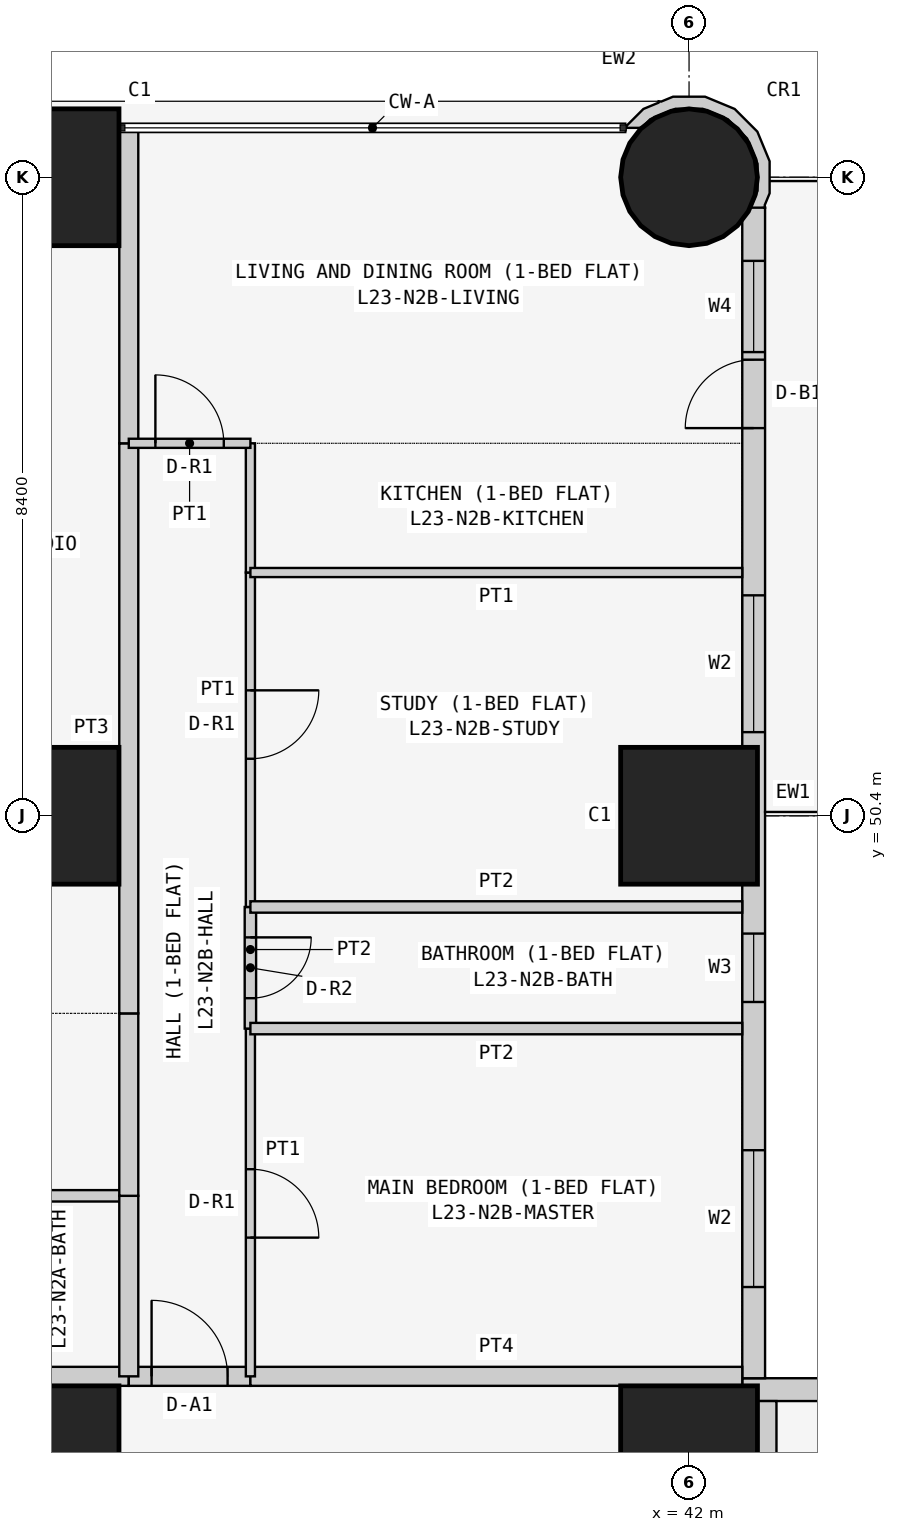
"""IFC4 building model, lengths in metres.
Left out: names, types, materials, properties, quantities, classifications, styles, units other than length and angle.
Written with IfcOpenShell. Run it as: python <this file> out.ifc"""

import sys

from ifc_helpers import new_model, si_unit, direction, frame, frame_2d, origin, origin_2d, place, context, subcontext, project, spatial, polyline, rectangle, circle, outline, extrude, element, fill, save


model = new_model("IFC4")
c1 = context("Model", 3, precision=1e-05, world=origin(), true_north=direction((0.0, 1.0)))
c2 = subcontext(c1, "Body", "Model", "MODEL_VIEW")
j1 = project(units=[si_unit("LENGTHUNIT", "METRE"), si_unit("PLANEANGLEUNIT", "RADIAN")], contexts=[c1])
p1 = place(None, origin())
s1 = spatial("IfcSite", under=j1, at=p1, CompositionType="ELEMENT")
p2 = place(p1, origin())
s2 = spatial("IfcBuilding", under=s1, at=p2, CompositionType="ELEMENT")
p3 = place(p2, frame((0.0, 0.0, 92.1)))
s3 = spatial("IfcBuildingStorey", under=s2, at=p3, CompositionType="ELEMENT", Elevation=92.1)
for number, where, z_axis, x_axis in (
    (1, (33.6, 42.0, 0.0), (0.0, 0.0, 1.0), (1.0, 0.0, 0.0)),
    (2, (33.6, 50.4, 0.0), (0.0, 0.0, 1.0), (1.0, 0.0, 0.0)),
    (3, (33.6, 58.8, 0.0), (0.0, 0.0, 1.0), (1.0, 0.0, 0.0)),
    (4, (42.0, 42.0, 0.0), (0.0, 0.0, 1.0), (1.0, 0.0, 0.0)),
    (5, (42.0, 50.4, 0.0), (0.0, 0.0, 1.0), (1.0, 0.0, 0.0)),
):
    element("IfcColumn", number, at=place(p3, frame(where, z_axis=z_axis, x_axis=x_axis)), inside=s3, PredefinedType="COLUMN", context=c2, shape_type="SweptSolid", body=[
        extrude(rectangle(XDim=1.8, YDim=1.8, at=origin_2d()), origin(), (0.0, 0.0, 1.0), 3.6),
    ])
p4 = place(p3, frame((42.0, 58.8, 0.0), z_axis=(0.0, 0.0, 1.0), x_axis=(1.0, 0.0, 0.0)))
e6 = element("IfcColumn", 6, at=p4, inside=s3, PredefinedType="COLUMN", context=c2, shape_type="SweptSolid", body=[
    extrude(circle(Radius=0.9, at=origin_2d()), origin(), (0.0, 0.0, 1.0), 3.6),
])
p5 = place(p3, frame((58.4, 42.85, 0.0), z_axis=(0.0, 0.0, 1.0), x_axis=(-1.0, 0.0, 0.0)))
e7 = element("IfcWall", 7, at=p5, inside=s3, PredefinedType="SOLIDWALL", context=c2, shape_type="SweptSolid", body=[
    extrude(rectangle(XDim=15.7, YDim=0.3, at=frame_2d((7.85, 0.0))), origin(), (0.0, 0.0, 1.0), 3.45),
])
p6 = place(p5, frame((12.4, 0.0, 0.9)))
e8 = element("IfcOpeningElement", 8, at=p6, cuts=e7, PredefinedType="OPENING", context=c2, shape_type="SweptSolid", body=[
    extrude(rectangle(XDim=1.8, YDim=1.5, at=frame_2d((0.9, 0.75))), frame((0.0, 0.16, 0.0), z_axis=(0.0, -1.0, 0.0), x_axis=(1.0, 0.0, 0.0)), (0.0, 0.0, 1.0), 0.32),
])
p7 = place(p5, frame((9.55, 0.0, 1.5)))
e9 = element("IfcOpeningElement", 9, at=p7, cuts=e7, PredefinedType="OPENING", context=c2, shape_type="SweptSolid", body=[
    extrude(rectangle(XDim=0.9, YDim=0.7, at=frame_2d((0.45, 0.35))), frame((0.0, 0.16, 0.0), z_axis=(0.0, -1.0, 0.0), x_axis=(1.0, 0.0, 0.0)), (0.0, 0.0, 1.0), 0.32),
])
p8 = place(p5, frame((5.1, 0.0, 0.9)))
e10 = element("IfcOpeningElement", 10, at=p8, cuts=e7, PredefinedType="OPENING", context=c2, shape_type="SweptSolid", body=[
    extrude(rectangle(XDim=1.8, YDim=1.5, at=frame_2d((0.9, 0.75))), frame((0.0, 0.16, 0.0), z_axis=(0.0, -1.0, 0.0), x_axis=(1.0, 0.0, 0.0)), (0.0, 0.0, 1.0), 0.32),
])
p9 = place(p5, frame((2.0, 0.0, 0.0)))
e11 = element("IfcOpeningElement", 11, at=p9, cuts=e7, PredefinedType="OPENING", context=c2, shape_type="SweptSolid", body=[
    extrude(rectangle(XDim=0.9, YDim=2.4, at=frame_2d((0.45, 1.2))), frame((0.0, 0.16, 0.0), z_axis=(0.0, -1.0, 0.0), x_axis=(1.0, 0.0, 0.0)), (0.0, 0.0, 1.0), 0.32),
])
p10 = place(p5, frame((0.7, 0.0, 0.9)))
e12 = element("IfcOpeningElement", 12, at=p10, cuts=e7, PredefinedType="OPENING", context=c2, shape_type="SweptSolid", body=[
    extrude(rectangle(XDim=1.2, YDim=1.5, at=frame_2d((0.6, 0.75))), frame((0.0, 0.16, 0.0), z_axis=(0.0, -1.0, 0.0), x_axis=(1.0, 0.0, 0.0)), (0.0, 0.0, 1.0), 0.32),
])
p11 = place(p3, frame((42.85, 43.0, 0.0), z_axis=(0.0, 0.0, 1.0), x_axis=(0.0, 1.0, 0.0)))
e13 = element("IfcWall", 13, at=p11, inside=s3, PredefinedType="SOLIDWALL", context=c2, shape_type="SweptSolid", body=[
    extrude(rectangle(XDim=15.4, YDim=0.3, at=frame_2d((7.7, 0.0))), origin(), (0.0, 0.0, 1.0), 3.45),
])
p12 = place(p11, frame((1.2, 0.0, 0.9)))
e14 = element("IfcOpeningElement", 14, at=p12, cuts=e13, PredefinedType="OPENING", context=c2, shape_type="SweptSolid", body=[
    extrude(rectangle(XDim=1.8, YDim=1.5, at=frame_2d((0.9, 0.75))), frame((0.0, 0.16, 0.0), z_axis=(0.0, -1.0, 0.0), x_axis=(1.0, 0.0, 0.0)), (0.0, 0.0, 1.0), 0.32),
])
p13 = place(p11, frame((4.95, 0.0, 1.5)))
e15 = element("IfcOpeningElement", 15, at=p13, cuts=e13, PredefinedType="OPENING", context=c2, shape_type="SweptSolid", body=[
    extrude(rectangle(XDim=0.9, YDim=0.7, at=frame_2d((0.45, 0.35))), frame((0.0, 0.16, 0.0), z_axis=(0.0, -1.0, 0.0), x_axis=(1.0, 0.0, 0.0)), (0.0, 0.0, 1.0), 0.32),
])
p14 = place(p11, frame((8.5, 0.0, 0.9)))
e16 = element("IfcOpeningElement", 16, at=p14, cuts=e13, PredefinedType="OPENING", context=c2, shape_type="SweptSolid", body=[
    extrude(rectangle(XDim=1.8, YDim=1.5, at=frame_2d((0.9, 0.75))), frame((0.0, 0.16, 0.0), z_axis=(0.0, -1.0, 0.0), x_axis=(1.0, 0.0, 0.0)), (0.0, 0.0, 1.0), 0.32),
])
p15 = place(p11, frame((12.5, 0.0, 0.0)))
e17 = element("IfcOpeningElement", 17, at=p15, cuts=e13, PredefinedType="OPENING", context=c2, shape_type="SweptSolid", body=[
    extrude(rectangle(XDim=0.9, YDim=2.4, at=frame_2d((0.45, 1.2))), frame((0.0, 0.16, 0.0), z_axis=(0.0, -1.0, 0.0), x_axis=(1.0, 0.0, 0.0)), (0.0, 0.0, 1.0), 0.32),
])
p16 = place(p11, frame((13.5, 0.0, 0.9)))
e18 = element("IfcOpeningElement", 18, at=p16, cuts=e13, PredefinedType="OPENING", context=c2, shape_type="SweptSolid", body=[
    extrude(rectangle(XDim=1.2, YDim=1.5, at=frame_2d((0.6, 0.75))), frame((0.0, 0.16, 0.0), z_axis=(0.0, -1.0, 0.0), x_axis=(1.0, 0.0, 0.0)), (0.0, 0.0, 1.0), 0.32),
])
p17 = place(p3, frame((42.91, 58.436, 0.0), z_axis=(0.0, 0.0, 1.0), x_axis=(0.377204953059, 0.926129809145, 0.0)))
e19 = element("IfcWall", 19, at=p17, inside=s3, PredefinedType="SOLIDWALL", context=c2, shape_type="SweptSolid", body=[
    extrude(outline(polyline([(0.769, 1.728), (0.75, 1.723), (0.6, 1.875), (0.295, 2.004), (0.281, 1.998), (0.36, 1.803), (0.509, 1.741), (0.761, 1.486), (0.896, 1.154), (0.894, 0.795), (0.755, 0.465), (0.5, 0.213), (0.168, 0.078), (-0.1, 0.08), (0.001, -0.097), (0.03, -0.08), (0.198, -0.081), (0.589, 0.078), (0.889, 0.374), (1.052, 0.763), (1.055, 1.185), (0.896, 1.575), (0.778, 1.695), (0.769, 1.728)])), origin(), (0.0, 0.0, 1.0), 3.45),
])
p18 = place(p3, frame((32.0, 43.025, 0.0), z_axis=(0.0, 0.0, 1.0), x_axis=(1.0, 0.0, 0.0)))
e20 = element("IfcWall", 20, at=p18, inside=s3, PredefinedType="PARTITIONING", context=c2, shape_type="SweptSolid", body=[
    extrude(rectangle(XDim=2.629, YDim=0.25, at=frame_2d((1.314, 0.0))), origin(), (0.0, 0.0, 1.0), 3.45),
])
p19 = place(p3, frame((34.629, 43.025, 0.0), z_axis=(0.0, 0.0, 1.0), x_axis=(1.0, 0.0, 0.0)))
e21 = element("IfcWall", 21, at=p19, inside=s3, PredefinedType="PARTITIONING", context=c2, shape_type="SweptSolid", body=[
    extrude(rectangle(XDim=1.6, YDim=0.25, at=frame_2d((0.8, 0.0))), origin(), (0.0, 0.0, 1.0), 3.45),
])
p20 = place(p19, frame((0.3, 0.0, 0.0)))
e22 = element("IfcOpeningElement", 22, at=p20, cuts=e21, PredefinedType="OPENING", context=c2, shape_type="SweptSolid", body=[
    extrude(rectangle(XDim=1.0, YDim=2.1, at=frame_2d((0.5, 1.05))), frame((0.0, 0.135, 0.0), z_axis=(0.0, -1.0, 0.0), x_axis=(1.0, 0.0, 0.0)), (0.0, 0.0, 1.0), 0.27),
])
p21 = place(p3, frame((36.229, 43.025, 0.0), z_axis=(0.0, 0.0, 1.0), x_axis=(1.0, 0.0, 0.0)))
e23 = element("IfcWall", 23, at=p21, inside=s3, PredefinedType="PARTITIONING", context=c2, shape_type="SweptSolid", body=[
    extrude(rectangle(XDim=6.471, YDim=0.25, at=frame_2d((3.235, 0.0))), origin(), (0.0, 0.0, 1.0), 3.45),
])
p22 = place(p3, frame((43.025, 42.7, 0.0), z_axis=(0.0, 0.0, 1.0), x_axis=(0.0, -1.0, 0.0)))
e24 = element("IfcWall", 24, at=p22, inside=s3, PredefinedType="PARTITIONING", context=c2, shape_type="SweptSolid", body=[
    extrude(rectangle(XDim=6.871, YDim=0.25, at=frame_2d((3.436, 0.0))), origin(), (0.0, 0.0, 1.0), 3.45),
])
p23 = place(p3, frame((32.0, 45.4, 0.0), z_axis=(0.0, 0.0, 1.0), x_axis=(1.0, 0.0, 0.0)))
e25 = element("IfcWall", 25, at=p23, inside=s3, PredefinedType="PARTITIONING", context=c2, shape_type="SweptSolid", body=[
    extrude(rectangle(XDim=2.629, YDim=0.15, at=frame_2d((1.314, 0.0))), origin(), (0.0, 0.0, 1.0), 3.45),
])
p24 = place(p3, frame((34.629, 45.4, 0.0), z_axis=(0.0, 0.0, 1.0), x_axis=(0.0, -1.0, 0.0)))
e26 = element("IfcWall", 26, at=p24, inside=s3, PredefinedType="PARTITIONING", context=c2, shape_type="SweptSolid", body=[
    extrude(rectangle(XDim=2.375, YDim=0.25, at=frame_2d((1.188, 0.0))), origin(), (0.0, 0.0, 1.0), 3.45),
])
p25 = place(p3, frame((34.629, 47.8, 0.0), z_axis=(0.0, 0.0, 1.0), x_axis=(0.0, -1.0, 0.0)))
e27 = element("IfcWall", 27, at=p25, inside=s3, PredefinedType="PARTITIONING", context=c2, shape_type="SweptSolid", body=[
    extrude(rectangle(XDim=2.4, YDim=0.25, at=frame_2d((1.2, 0.0))), origin(), (0.0, 0.0, 1.0), 3.45),
])
p26 = place(p3, frame((34.629, 55.3, 0.0), z_axis=(0.0, 0.0, 1.0), x_axis=(0.0, -1.0, 0.0)))
e28 = element("IfcWall", 28, at=p26, inside=s3, PredefinedType="PARTITIONING", context=c2, shape_type="SweptSolid", body=[
    extrude(rectangle(XDim=7.5, YDim=0.25, at=frame_2d((3.75, 0.0))), origin(), (0.0, 0.0, 1.0), 3.45),
])
p27 = place(p3, frame((34.629, 59.45, 0.0), z_axis=(0.0, 0.0, 1.0), x_axis=(0.0, -1.0, 0.0)))
e29 = element("IfcWall", 29, at=p27, inside=s3, PredefinedType="PARTITIONING", context=c2, shape_type="SweptSolid", body=[
    extrude(rectangle(XDim=4.15, YDim=0.25, at=frame_2d((2.075, 0.0))), origin(), (0.0, 0.0, 1.0), 3.45),
])
p28 = place(p3, frame((36.229, 47.6, 0.0), z_axis=(0.0, 0.0, 1.0), x_axis=(0.0, -1.0, 0.0)))
e30 = element("IfcWall", 30, at=p28, inside=s3, PredefinedType="PARTITIONING", context=c2, shape_type="SweptSolid", body=[
    extrude(rectangle(XDim=4.575, YDim=0.12, at=frame_2d((2.288, 0.0))), origin(), (0.0, 0.0, 1.0), 3.45),
])
p29 = place(p28, frame((1.85, 0.0, 0.0)))
e31 = element("IfcOpeningElement", 31, at=p29, cuts=e30, PredefinedType="OPENING", context=c2, shape_type="SweptSolid", body=[
    extrude(rectangle(XDim=0.9, YDim=2.1, at=frame_2d((0.45, 1.05))), frame((0.0, 0.07, 0.0), z_axis=(0.0, -1.0, 0.0), x_axis=(1.0, 0.0, 0.0)), (0.0, 0.0, 1.0), 0.14),
])
p30 = place(p3, frame((36.229, 49.2, 0.0), z_axis=(0.0, 0.0, 1.0), x_axis=(0.0, -1.0, 0.0)))
e32 = element("IfcWall", 32, at=p30, inside=s3, PredefinedType="PARTITIONING", context=c2, shape_type="SweptSolid", body=[
    extrude(rectangle(XDim=1.6, YDim=0.15, at=frame_2d((0.8, 0.0))), origin(), (0.0, 0.0, 1.0), 3.45),
])
p31 = place(p30, frame((0.4, 0.0, 0.0)))
e33 = element("IfcOpeningElement", 33, at=p31, cuts=e32, PredefinedType="OPENING", context=c2, shape_type="SweptSolid", body=[
    extrude(rectangle(XDim=0.8, YDim=2.1, at=frame_2d((0.4, 1.05))), frame((0.0, 0.085, 0.0), z_axis=(0.0, -1.0, 0.0), x_axis=(1.0, 0.0, 0.0)), (0.0, 0.0, 1.0), 0.17),
])
p32 = place(p3, frame((36.229, 53.6, 0.0), z_axis=(0.0, 0.0, 1.0), x_axis=(0.0, -1.0, 0.0)))
e34 = element("IfcWall", 34, at=p32, inside=s3, PredefinedType="PARTITIONING", context=c2, shape_type="SweptSolid", body=[
    extrude(rectangle(XDim=4.4, YDim=0.12, at=frame_2d((2.2, 0.0))), origin(), (0.0, 0.0, 1.0), 3.45),
])
p33 = place(p32, frame((1.55, 0.0, 0.0)))
e35 = element("IfcOpeningElement", 35, at=p33, cuts=e34, PredefinedType="OPENING", context=c2, shape_type="SweptSolid", body=[
    extrude(rectangle(XDim=0.9, YDim=2.1, at=frame_2d((0.45, 1.05))), frame((0.0, 0.07, 0.0), z_axis=(0.0, -1.0, 0.0), x_axis=(1.0, 0.0, 0.0)), (0.0, 0.0, 1.0), 0.14),
])
p34 = place(p3, frame((36.229, 55.3, 0.0), z_axis=(0.0, 0.0, 1.0), x_axis=(0.0, -1.0, 0.0)))
e36 = element("IfcWall", 36, at=p34, inside=s3, PredefinedType="PARTITIONING", context=c2, shape_type="SweptSolid", body=[
    extrude(rectangle(XDim=1.7, YDim=0.12, at=frame_2d((0.85, 0.0))), origin(), (0.0, 0.0, 1.0), 3.45),
])
p35 = place(p3, frame((34.629, 55.3, 0.0), z_axis=(0.0, 0.0, 1.0), x_axis=(1.0, 0.0, 0.0)))
e37 = element("IfcWall", 37, at=p35, inside=s3, PredefinedType="PARTITIONING", context=c2, shape_type="SweptSolid", body=[
    extrude(rectangle(XDim=1.6, YDim=0.12, at=frame_2d((0.8, 0.0))), origin(), (0.0, 0.0, 1.0), 3.45),
])
p36 = place(p35, frame((0.35, 0.0, 0.0)))
e38 = element("IfcOpeningElement", 38, at=p36, cuts=e37, PredefinedType="OPENING", context=c2, shape_type="SweptSolid", body=[
    extrude(rectangle(XDim=0.9, YDim=2.1, at=frame_2d((0.45, 1.05))), frame((0.0, 0.07, 0.0), z_axis=(0.0, -1.0, 0.0), x_axis=(1.0, 0.0, 0.0)), (0.0, 0.0, 1.0), 0.14),
])
for number, where, z_axis, x_axis in (
    (39, (36.229, 47.6, 0.0), (0.0, 0.0, 1.0), (1.0, 0.0, 0.0)),
    (40, (36.229, 49.2, 0.0), (0.0, 0.0, 1.0), (1.0, 0.0, 0.0)),
):
    element("IfcWall", number, at=place(p3, frame(where, z_axis=z_axis, x_axis=x_axis)), inside=s3, PredefinedType="PARTITIONING", context=c2, shape_type="SweptSolid", body=[
        extrude(rectangle(XDim=6.471, YDim=0.15, at=frame_2d((3.235, 0.0))), origin(), (0.0, 0.0, 1.0), 3.45),
    ])
p37 = place(p3, frame((36.229, 53.6, 0.0), z_axis=(0.0, 0.0, 1.0), x_axis=(1.0, 0.0, 0.0)))
e41 = element("IfcWall", 41, at=p37, inside=s3, PredefinedType="PARTITIONING", context=c2, shape_type="SweptSolid", body=[
    extrude(rectangle(XDim=6.471, YDim=0.12, at=frame_2d((3.235, 0.0))), origin(), (0.0, 0.0, 1.0), 3.45),
])
p38 = place(p12, origin())
e42 = element("IfcWindow", 42, at=p38, inside=s3, PartitioningType="SINGLE_PANEL", PredefinedType="WINDOW", context=c2, shape_type="SweptSolid", body=[
    extrude(rectangle(XDim=1.8, YDim=1.5, at=frame_2d((0.9, 0.75))), frame((0.0, 0.03, 0.0), z_axis=(0.0, -1.0, 0.0), x_axis=(1.0, 0.0, 0.0)), (0.0, 0.0, 1.0), 0.06),
])
fill(e14, e42)
p39 = place(p13, origin())
e43 = element("IfcWindow", 43, at=p39, inside=s3, PartitioningType="SINGLE_PANEL", PredefinedType="WINDOW", context=c2, shape_type="SweptSolid", body=[
    extrude(rectangle(XDim=0.9, YDim=0.7, at=frame_2d((0.45, 0.35))), frame((0.0, 0.03, 0.0), z_axis=(0.0, -1.0, 0.0), x_axis=(1.0, 0.0, 0.0)), (0.0, 0.0, 1.0), 0.06),
])
fill(e15, e43)
p40 = place(p14, origin())
e44 = element("IfcWindow", 44, at=p40, inside=s3, PartitioningType="SINGLE_PANEL", PredefinedType="WINDOW", context=c2, shape_type="SweptSolid", body=[
    extrude(rectangle(XDim=1.8, YDim=1.5, at=frame_2d((0.9, 0.75))), frame((0.0, 0.03, 0.0), z_axis=(0.0, -1.0, 0.0), x_axis=(1.0, 0.0, 0.0)), (0.0, 0.0, 1.0), 0.06),
])
fill(e16, e44)
p41 = place(p15, origin())
e45 = element("IfcDoor", 45, at=p41, inside=s3, OperationType="SINGLE_SWING_LEFT", PredefinedType="DOOR", context=c2, shape_type="SweptSolid", body=[
    extrude(rectangle(XDim=0.9, YDim=2.4, at=frame_2d((0.45, 1.2))), frame((0.0, 0.025, 0.0), z_axis=(0.0, -1.0, 0.0), x_axis=(1.0, 0.0, 0.0)), (0.0, 0.0, 1.0), 0.05),
])
fill(e17, e45)
p42 = place(p16, origin())
e46 = element("IfcWindow", 46, at=p42, inside=s3, PartitioningType="SINGLE_PANEL", PredefinedType="WINDOW", context=c2, shape_type="SweptSolid", body=[
    extrude(rectangle(XDim=1.2, YDim=1.5, at=frame_2d((0.6, 0.75))), frame((0.0, 0.03, 0.0), z_axis=(0.0, -1.0, 0.0), x_axis=(1.0, 0.0, 0.0)), (0.0, 0.0, 1.0), 0.06),
])
fill(e18, e46)
p43 = place(p20, origin())
e47 = element("IfcDoor", 47, at=p43, inside=s3, OperationType="SINGLE_SWING_LEFT", PredefinedType="DOOR", context=c2, shape_type="SweptSolid", body=[
    extrude(rectangle(XDim=1.0, YDim=2.1, at=frame_2d((0.5, 1.05))), frame((0.0, 0.025, 0.0), z_axis=(0.0, -1.0, 0.0), x_axis=(1.0, 0.0, 0.0)), (0.0, 0.0, 1.0), 0.05),
])
fill(e22, e47)
p44 = place(p29, origin())
e48 = element("IfcDoor", 48, at=p44, inside=s3, OperationType="SINGLE_SWING_RIGHT", PredefinedType="DOOR", context=c2, shape_type="SweptSolid", body=[
    extrude(rectangle(XDim=0.9, YDim=2.1, at=frame_2d((0.45, 1.05))), frame((0.0, 0.025, 0.0), z_axis=(0.0, -1.0, 0.0), x_axis=(1.0, 0.0, 0.0)), (0.0, 0.0, 1.0), 0.05),
])
fill(e31, e48)
p45 = place(p31, origin())
e49 = element("IfcDoor", 49, at=p45, inside=s3, OperationType="SINGLE_SWING_LEFT", PredefinedType="DOOR", context=c2, shape_type="SweptSolid", body=[
    extrude(rectangle(XDim=0.8, YDim=2.1, at=frame_2d((0.4, 1.05))), frame((0.0, 0.025, 0.0), z_axis=(0.0, -1.0, 0.0), x_axis=(1.0, 0.0, 0.0)), (0.0, 0.0, 1.0), 0.05),
])
fill(e33, e49)
p46 = place(p33, origin())
e50 = element("IfcDoor", 50, at=p46, inside=s3, OperationType="SINGLE_SWING_LEFT", PredefinedType="DOOR", context=c2, shape_type="SweptSolid", body=[
    extrude(rectangle(XDim=0.9, YDim=2.1, at=frame_2d((0.45, 1.05))), frame((0.0, 0.025, 0.0), z_axis=(0.0, -1.0, 0.0), x_axis=(1.0, 0.0, 0.0)), (0.0, 0.0, 1.0), 0.05),
])
fill(e35, e50)
p47 = place(p36, origin())
e51 = element("IfcDoor", 51, at=p47, inside=s3, OperationType="SINGLE_SWING_LEFT", PredefinedType="DOOR", context=c2, shape_type="SweptSolid", body=[
    extrude(rectangle(XDim=0.9, YDim=2.1, at=frame_2d((0.45, 1.05))), frame((0.0, 0.025, 0.0), z_axis=(0.0, -1.0, 0.0), x_axis=(1.0, 0.0, 0.0)), (0.0, 0.0, 1.0), 0.05),
])
fill(e38, e51)
save(model, sys.argv[1])
